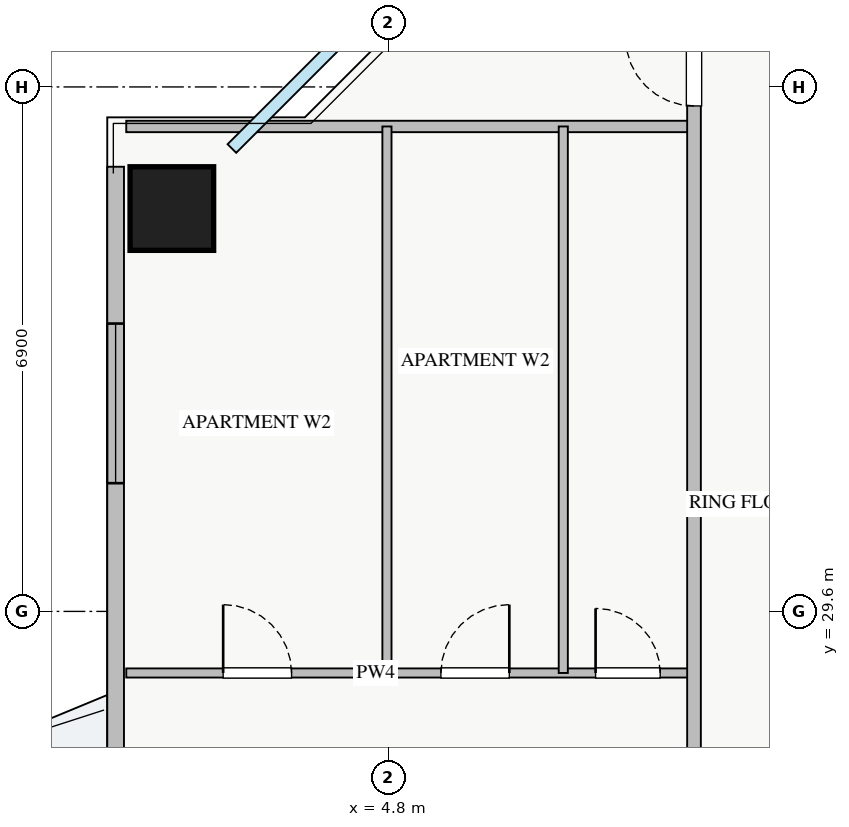
"""IFC4 building model, lengths in metres.
Left out: names, types, materials, properties, quantities, classifications, styles, units other than length and angle.
Written with IfcOpenShell. Run it as: python <this file> out.ifc"""

import sys

from ifc_helpers import new_model, si_unit, direction, frame, frame_2d, origin, origin_2d, place, context, subcontext, project, spatial, rectangle, extrude, source, transform, mapped, element, fill, save


model = new_model("IFC4")
c1 = context("Model", 3, precision=1e-05, world=origin(), true_north=direction((0.0, 1.0)))
c2 = subcontext(c1, "Body", "Model", "MODEL_VIEW")
j1 = project(units=[si_unit("LENGTHUNIT", "METRE"), si_unit("PLANEANGLEUNIT", "RADIAN")], contexts=[c1])
p1 = place(None, origin())
s1 = spatial("IfcSite", under=j1, at=p1, CompositionType="ELEMENT")
p2 = place(p1, origin())
s2 = spatial("IfcBuilding", under=s1, at=p2, CompositionType="ELEMENT")
p3 = place(p2, frame((0.0, 0.0, 136.0)))
s3 = spatial("IfcBuildingStorey", under=s2, at=p3, CompositionType="ELEMENT", Elevation=136.0)
m1 = source(origin(), c2, "Body", "SweptSolid", [
    extrude(rectangle(XDim=1.1, YDim=1.1, at=origin_2d()), origin(), (0.0, 0.0, 1.0), 3.25),
])
p4 = place(p3, frame((1.95, 34.9, 0.0), z_axis=(0.0, 0.0, 1.0), x_axis=(1.0, 0.0, 0.0)))
e1 = element("IfcColumn", 1, at=p4, inside=s3, PredefinedType="COLUMN", context=c2, shape_type="MappedRepresentation", body=[
    mapped(m1, transform((0.0, 0.0, 0.0), x_axis=(1.0, 0.0, 0.0), y_axis=(0.0, 1.0, 0.0), z_axis=(0.0, 0.0, 1.0), scale=1.0)),
])
p5 = place(p3, frame((1.21, 10.55, 0.0), z_axis=(0.0, 0.0, 1.0), x_axis=(0.0, 1.0, 0.0)))
e2 = element("IfcWall", 2, at=p5, inside=s3, PredefinedType="STANDARD", context=c2, shape_type="SweptSolid", body=[
    extrude(rectangle(XDim=24.9, YDim=0.22, at=frame_2d((12.45, 0.0))), origin(), (0.0, 0.0, 1.0), 2.57),
])
p6 = place(p5, frame((13.3, 0.0, 0.0)))
e3 = element("IfcOpeningElement", 3, at=p6, cuts=e2, PredefinedType="OPENING", context=c2, shape_type="SweptSolid", body=[
    extrude(rectangle(XDim=1.2, YDim=2.1, at=frame_2d((0.6, 1.05))), frame((0.0, 0.12, 0.0), z_axis=(0.0, -1.0, 0.0), x_axis=(1.0, 0.0, 0.0)), (0.0, 0.0, 1.0), 0.24),
])
p7 = place(p5, frame((1.912, 0.0, 0.9)))
e4 = element("IfcOpeningElement", 4, at=p7, cuts=e2, PredefinedType="OPENING", context=c2, shape_type="SweptSolid", body=[
    extrude(rectangle(XDim=2.4, YDim=1.48, at=frame_2d((1.2, 0.74))), frame((0.0, 0.12, 0.0), z_axis=(0.0, -1.0, 0.0), x_axis=(1.0, 0.0, 0.0)), (0.0, 0.0, 1.0), 0.24),
])
p8 = place(p5, frame((20.737, 0.0, 0.9)))
e5 = element("IfcOpeningElement", 5, at=p8, cuts=e2, PredefinedType="OPENING", context=c2, shape_type="SweptSolid", body=[
    extrude(rectangle(XDim=2.1, YDim=1.48, at=frame_2d((1.05, 0.74))), frame((0.0, 0.12, 0.0), z_axis=(0.0, -1.0, 0.0), x_axis=(1.0, 0.0, 0.0)), (0.0, 0.0, 1.0), 0.24),
])
p9 = place(p5, frame((11.845, 0.0, 0.9)))
e6 = element("IfcOpeningElement", 6, at=p9, cuts=e2, PredefinedType="OPENING", context=c2, shape_type="SweptSolid", body=[
    extrude(rectangle(XDim=0.9, YDim=1.2, at=frame_2d((0.45, 0.6))), frame((0.0, 0.12, 0.0), z_axis=(0.0, -1.0, 0.0), x_axis=(1.0, 0.0, 0.0)), (0.0, 0.0, 1.0), 0.24),
])
p10 = place(p3, frame((1.35, 35.98, 0.0), z_axis=(0.0, 0.0, 1.0), x_axis=(1.0, 0.0, 0.0)))
e7 = element("IfcWall", 7, at=p10, inside=s3, PredefinedType="PARTITIONING", context=c2, shape_type="SweptSolid", body=[
    extrude(rectangle(XDim=7.47, YDim=0.15, at=frame_2d((3.735, 0.0))), origin(), (0.0, 0.0, 1.0), 3.03),
])
p11 = place(p3, frame((1.35, 28.79, 0.0), z_axis=(0.0, 0.0, 1.0), x_axis=(1.0, 0.0, 0.0)))
e8 = element("IfcWall", 8, at=p11, inside=s3, PredefinedType="PLUMBINGWALL", context=c2, shape_type="SweptSolid", body=[
    extrude(rectangle(XDim=7.47, YDim=0.12, at=frame_2d((3.735, 0.0))), origin(), (0.0, 0.0, 1.0), 3.03),
])
p12 = place(p11, frame((1.275, 0.0, 0.0)))
e9 = element("IfcOpeningElement", 9, at=p12, cuts=e8, PredefinedType="OPENING", context=c2, shape_type="SweptSolid", body=[
    extrude(rectangle(XDim=0.9, YDim=2.05, at=frame_2d((0.45, 1.025))), frame((0.0, 0.07, 0.0), z_axis=(0.0, -1.0, 0.0), x_axis=(1.0, 0.0, 0.0)), (0.0, 0.0, 1.0), 0.14),
])
p13 = place(p11, frame((4.14, 0.0, 0.0)))
e10 = element("IfcOpeningElement", 10, at=p13, cuts=e8, PredefinedType="OPENING", context=c2, shape_type="SweptSolid", body=[
    extrude(rectangle(XDim=0.9, YDim=2.05, at=frame_2d((0.45, 1.025))), frame((0.0, 0.07, 0.0), z_axis=(0.0, -1.0, 0.0), x_axis=(1.0, 0.0, 0.0)), (0.0, 0.0, 1.0), 0.14),
])
p14 = place(p11, frame((6.175, 0.0, 0.0)))
e11 = element("IfcOpeningElement", 11, at=p14, cuts=e8, PredefinedType="OPENING", context=c2, shape_type="SweptSolid", body=[
    extrude(rectangle(XDim=0.85, YDim=2.05, at=frame_2d((0.425, 1.025))), frame((0.0, 0.07, 0.0), z_axis=(0.0, -1.0, 0.0), x_axis=(1.0, 0.0, 0.0)), (0.0, 0.0, 1.0), 0.14),
])
p15 = place(p3, frame((4.78, 28.79, 0.0), z_axis=(0.0, 0.0, 1.0), x_axis=(0.0, 1.0, 0.0)))
e12 = element("IfcWall", 12, at=p15, inside=s3, PredefinedType="PLUMBINGWALL", context=c2, shape_type="SweptSolid", body=[
    extrude(rectangle(XDim=7.19, YDim=0.12, at=frame_2d((3.595, 0.0))), origin(), (0.0, 0.0, 1.0), 3.03),
])
p16 = place(p3, frame((7.1, 28.79, 0.0), z_axis=(0.0, 0.0, 1.0), x_axis=(0.0, 1.0, 0.0)))
e13 = element("IfcWall", 13, at=p16, inside=s3, PredefinedType="PLUMBINGWALL", context=c2, shape_type="SweptSolid", body=[
    extrude(rectangle(XDim=7.19, YDim=0.12, at=frame_2d((3.595, 0.0))), origin(), (0.0, 0.0, 1.0), 2.537),
])
p17 = place(p3, frame((8.82, 8.31, 0.0), z_axis=(0.0, 0.0, 1.0), x_axis=(0.0, 1.0, 0.0)))
e14 = element("IfcWall", 14, at=p17, inside=s3, PredefinedType="PARTITIONING", context=c2, shape_type="SweptSolid", body=[
    extrude(rectangle(XDim=29.13, YDim=0.18, at=frame_2d((14.565, 0.0))), origin(), (0.0, 0.0, 1.0), 3.03),
])
p18 = place(p17, frame((27.94, 0.0, 0.0)))
e15 = element("IfcOpeningElement", 15, at=p18, cuts=e14, PredefinedType="OPENING", context=c2, shape_type="SweptSolid", body=[
    extrude(rectangle(XDim=0.9, YDim=2.05, at=frame_2d((0.45, 1.025))), frame((0.0, 0.1, 0.0), z_axis=(0.0, -1.0, 0.0), x_axis=(1.0, 0.0, 0.0)), (0.0, 0.0, 1.0), 0.2),
])
p19 = place(p17, frame((0.24, 0.0, 0.0)))
e16 = element("IfcOpeningElement", 16, at=p19, cuts=e14, PredefinedType="OPENING", context=c2, shape_type="SweptSolid", body=[
    extrude(rectangle(XDim=0.9, YDim=2.05, at=frame_2d((0.45, 1.025))), frame((0.0, 0.1, 0.0), z_axis=(0.0, -1.0, 0.0), x_axis=(1.0, 0.0, 0.0)), (0.0, 0.0, 1.0), 0.2),
])
p20 = place(p17, frame((7.105, 0.0, 0.0)))
e17 = element("IfcOpeningElement", 17, at=p20, cuts=e14, PredefinedType="OPENING", context=c2, shape_type="SweptSolid", body=[
    extrude(rectangle(XDim=1.0, YDim=2.05, at=frame_2d((0.5, 1.025))), frame((0.0, 0.1, 0.0), z_axis=(0.0, -1.0, 0.0), x_axis=(1.0, 0.0, 0.0)), (0.0, 0.0, 1.0), 0.2),
])
p21 = place(p17, frame((16.475, 0.0, 0.0)))
e18 = element("IfcOpeningElement", 18, at=p21, cuts=e14, PredefinedType="OPENING", context=c2, shape_type="SweptSolid", body=[
    extrude(rectangle(XDim=1.0, YDim=2.05, at=frame_2d((0.5, 1.025))), frame((0.0, 0.1, 0.0), z_axis=(0.0, -1.0, 0.0), x_axis=(1.0, 0.0, 0.0)), (0.0, 0.0, 1.0), 0.2),
])
m2 = source(origin(), c2, "Body", "SweptSolid", [
    extrude(rectangle(XDim=2.1, YDim=1.48, at=frame_2d((1.05, 0.74))), frame((0.0, 0.03, 0.0), z_axis=(0.0, -1.0, 0.0), x_axis=(1.0, 0.0, 0.0)), (0.0, 0.0, 1.0), 0.06),
])
p22 = place(p8, origin())
e19 = element("IfcWindow", 19, at=p22, inside=s3, PartitioningType="TRIPLE_PANEL_VERTICAL", PredefinedType="WINDOW", context=c2, shape_type="MappedRepresentation", body=[
    mapped(m2, transform((0.0, 0.0, 0.0), x_axis=(1.0, 0.0, 0.0), y_axis=(0.0, 1.0, 0.0), z_axis=(0.0, 0.0, 1.0), scale=1.0)),
])
fill(e5, e19)
m3 = source(origin(), c2, "Body", "SweptSolid", [
    extrude(rectangle(XDim=0.9, YDim=2.05, at=frame_2d((0.45, 1.025))), frame((0.0, 0.025, 0.0), z_axis=(0.0, -1.0, 0.0), x_axis=(1.0, 0.0, 0.0)), (0.0, 0.0, 1.0), 0.05),
])
p23 = place(p12, origin())
e20 = element("IfcDoor", 20, at=p23, inside=s3, OperationType="SINGLE_SWING_LEFT", PredefinedType="DOOR", context=c2, shape_type="MappedRepresentation", body=[
    mapped(m3, transform((0.0, 0.0, 0.0), x_axis=(1.0, 0.0, 0.0), y_axis=(0.0, 1.0, 0.0), z_axis=(0.0, 0.0, 1.0), scale=1.0)),
])
fill(e9, e20)
p24 = place(p13, origin())
e21 = element("IfcDoor", 21, at=p24, inside=s3, OperationType="SINGLE_SWING_RIGHT", PredefinedType="DOOR", context=c2, shape_type="MappedRepresentation", body=[
    mapped(m3, transform((0.0, 0.0, 0.0), x_axis=(1.0, 0.0, 0.0), y_axis=(0.0, 1.0, 0.0), z_axis=(0.0, 0.0, 1.0), scale=1.0)),
])
fill(e10, e21)
m4 = source(origin(), c2, "Body", "SweptSolid", [
    extrude(rectangle(XDim=0.85, YDim=2.05, at=frame_2d((0.425, 1.025))), frame((0.0, 0.025, 0.0), z_axis=(0.0, -1.0, 0.0), x_axis=(1.0, 0.0, 0.0)), (0.0, 0.0, 1.0), 0.05),
])
p25 = place(p14, origin())
e22 = element("IfcDoor", 22, at=p25, inside=s3, OperationType="SINGLE_SWING_LEFT", PredefinedType="DOOR", context=c2, shape_type="MappedRepresentation", body=[
    mapped(m4, transform((0.0, 0.0, 0.0), x_axis=(1.0, 0.0, 0.0), y_axis=(0.0, 1.0, 0.0), z_axis=(0.0, 0.0, 1.0), scale=1.0)),
])
fill(e11, e22)
p26 = place(p18, origin())
e23 = element("IfcDoor", 23, at=p26, inside=s3, OperationType="SINGLE_SWING_RIGHT", PredefinedType="DOOR", context=c2, shape_type="MappedRepresentation", body=[
    mapped(m3, transform((0.0, 0.0, 0.0), x_axis=(1.0, 0.0, 0.0), y_axis=(0.0, 1.0, 0.0), z_axis=(0.0, 0.0, 1.0), scale=1.0)),
])
fill(e15, e23)
save(model, sys.argv[1])
